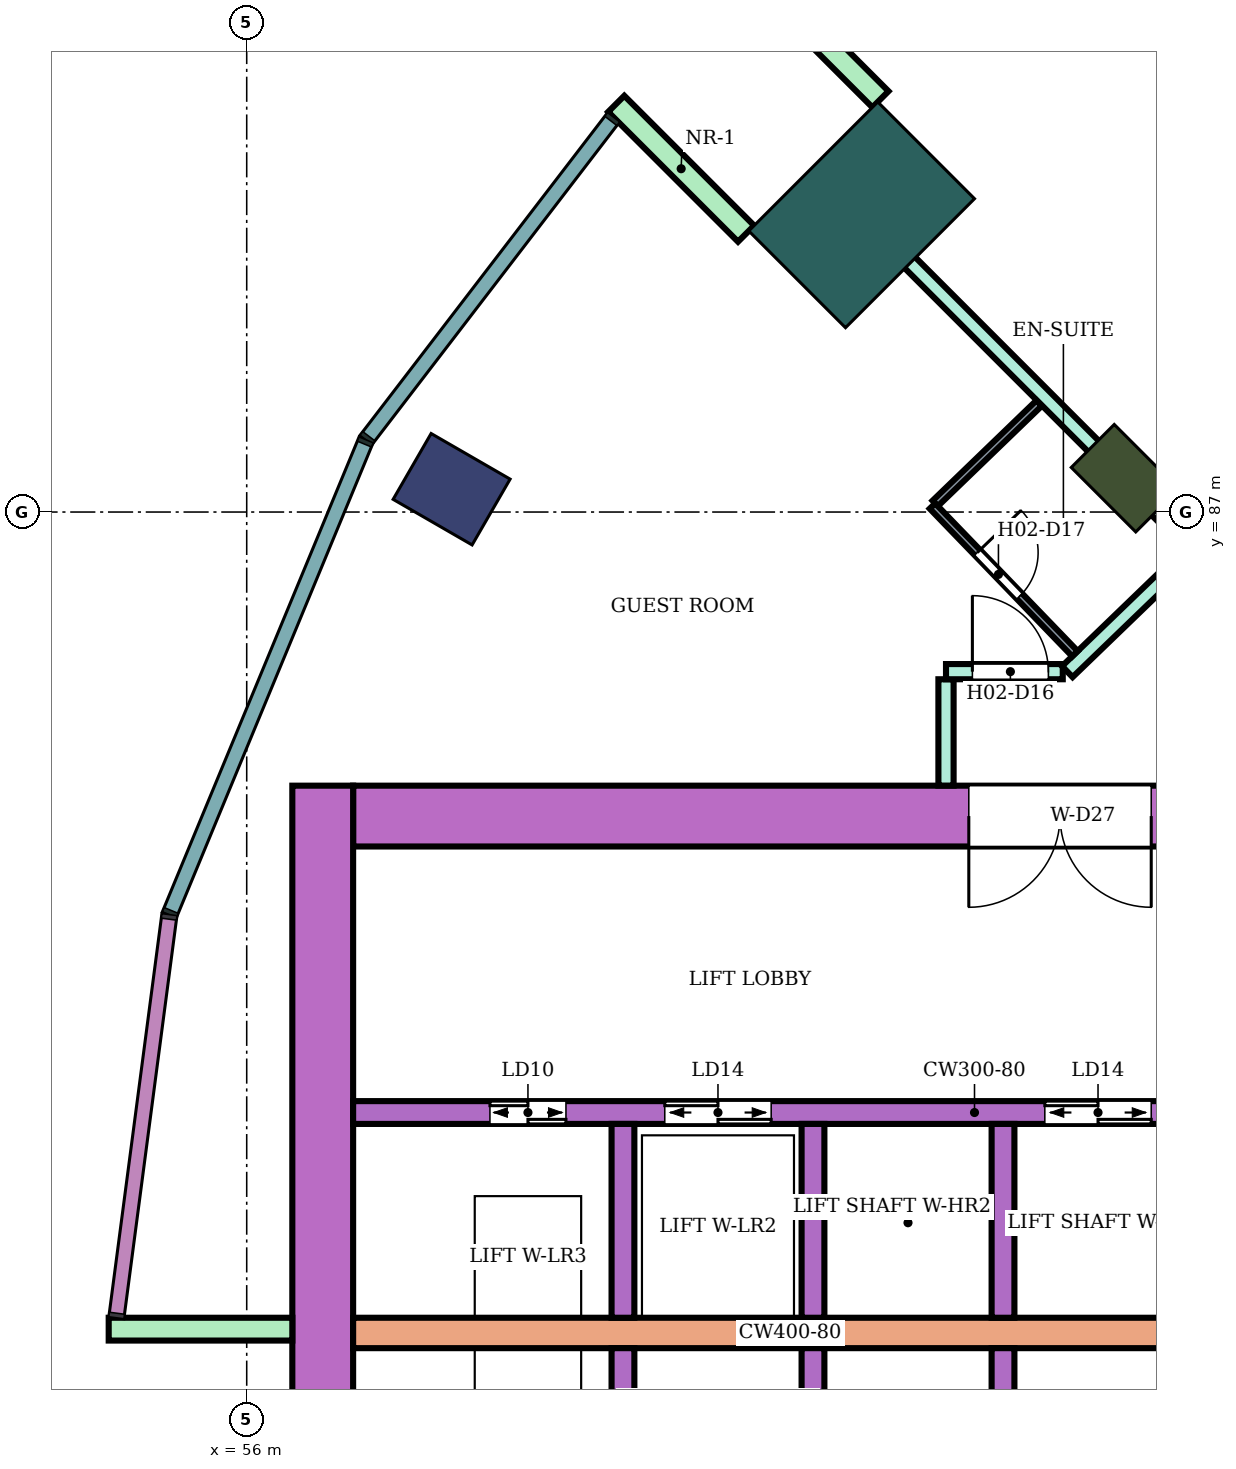
"""IFC4 building model, lengths in metres.
Left out: names, types, materials, properties, quantities, classifications, styles, units other than length and angle.
Written with IfcOpenShell. Run it as: python <this file> out.ifc"""

import sys

from ifc_helpers import new_model, si_unit, direction, frame, frame_2d, origin, origin_2d, place, context, subcontext, project, spatial, rectangle, extrude, element, fill, save


model = new_model("IFC4")
c1 = context("Model", 3, precision=1e-05, world=origin(), true_north=direction((0.0, 1.0)))
c2 = subcontext(c1, "Body", "Model", "MODEL_VIEW")
j1 = project(units=[si_unit("LENGTHUNIT", "METRE"), si_unit("PLANEANGLEUNIT", "RADIAN")], contexts=[c1])
p1 = place(None, origin())
s1 = spatial("IfcSite", under=j1, at=p1, CompositionType="ELEMENT")
p2 = place(p1, origin())
s2 = spatial("IfcBuilding", under=s1, at=p2, CompositionType="ELEMENT")
p3 = place(p2, frame((0.0, 0.0, 47.8)))
s3 = spatial("IfcBuildingStorey", under=s2, at=p3, CompositionType="ELEMENT", Elevation=47.8)
p4 = place(p3, frame((58.696, 87.3, 0.0), z_axis=(0.0, 0.0, 1.0), x_axis=(-0.866025403784, 0.5, 0.0)))
e1 = element("IfcColumn", 1, at=p4, inside=s3, PredefinedType="COLUMN", context=c2, shape_type="SweptSolid", body=[
    extrude(rectangle(XDim=1.2, YDim=1.0, at=origin_2d()), origin(), (0.0, 0.0, 1.0), 3.8),
])
p5 = place(p3, frame((67.555, 87.445, 0.0), z_axis=(0.0, 0.0, 1.0), x_axis=(-0.707106781187, 0.707106781187, 0.0)))
e2 = element("IfcColumn", 2, at=p5, inside=s3, PredefinedType="COLUMN", context=c2, shape_type="SweptSolid", body=[
    extrude(rectangle(XDim=1.2, YDim=0.8, at=origin_2d()), origin(), (0.0, 0.0, 1.0), 3.8),
])
p6 = place(p3, frame((64.09, 90.91, 0.0), z_axis=(0.0, 0.0, 1.0), x_axis=(-0.707106781187, 0.707106781187, 0.0)))
e3 = element("IfcColumn", 3, at=p6, inside=s3, PredefinedType="COLUMN", context=c2, shape_type="SweptSolid", body=[
    extrude(rectangle(XDim=1.8, YDim=2.4, at=origin_2d()), origin(), (0.0, 0.0, 1.0), 3.8),
])
p7 = place(p3, frame((72.1, 83.0, 0.0), z_axis=(0.0, 0.0, 1.0), x_axis=(-1.0, 0.0, 0.0)))
e4 = element("IfcWall", 4, at=p7, inside=s3, PredefinedType="SHEAR", context=c2, shape_type="SweptSolid", body=[
    extrude(rectangle(XDim=14.7, YDim=0.8, at=frame_2d((7.35, 0.0))), origin(), (0.0, 0.0, 1.0), 3.48),
])
p8 = place(p7, frame((4.2, 0.0, 0.0)))
e5 = element("IfcOpeningElement", 5, at=p8, cuts=e4, PredefinedType="OPENING", context=c2, shape_type="SweptSolid", body=[
    extrude(rectangle(XDim=2.4, YDim=2.4, at=frame_2d((1.2, 1.2))), frame((0.0, 0.41, 0.0), z_axis=(0.0, -1.0, 0.0), x_axis=(1.0, 0.0, 0.0)), (0.0, 0.0, 1.0), 0.82),
])
p9 = place(p3, frame((57.0, 83.4, 0.0), z_axis=(0.0, 0.0, 1.0), x_axis=(0.0, -1.0, 0.0)))
e6 = element("IfcWall", 6, at=p9, inside=s3, PredefinedType="SHEAR", context=c2, shape_type="SweptSolid", body=[
    extrude(rectangle(XDim=16.8, YDim=0.8, at=frame_2d((8.4, 0.0))), origin(), (0.0, 0.0, 1.0), 3.48),
])
p10 = place(p3, frame((68.3, 76.2, 0.0), z_axis=(0.0, 0.0, 1.0), x_axis=(-1.0, 0.0, 0.0)))
e7 = element("IfcWall", 7, at=p10, inside=s3, PredefinedType="SHEAR", context=c2, shape_type="SweptSolid", body=[
    extrude(rectangle(XDim=10.9, YDim=0.4, at=frame_2d((5.45, 0.0))), origin(), (0.0, 0.0, 1.0), 3.48),
])
p11 = place(p3, frame((68.3, 79.1, 0.0), z_axis=(0.0, 0.0, 1.0), x_axis=(-1.0, 0.0, 0.0)))
e8 = element("IfcWall", 8, at=p11, inside=s3, PredefinedType="SHEAR", context=c2, shape_type="SweptSolid", body=[
    extrude(rectangle(XDim=10.9, YDim=0.3, at=frame_2d((5.45, 0.0))), origin(), (0.0, 0.0, 1.0), 3.48),
])
p12 = place(p11, frame((0.4, 0.0, 0.0)))
e9 = element("IfcOpeningElement", 9, at=p12, cuts=e8, PredefinedType="OPENING", context=c2, shape_type="SweptSolid", body=[
    extrude(rectangle(XDim=1.4, YDim=2.1, at=frame_2d((0.7, 1.05))), frame((0.0, 0.16, 0.0), z_axis=(0.0, -1.0, 0.0), x_axis=(1.0, 0.0, 0.0)), (0.0, 0.0, 1.0), 0.32),
])
p13 = place(p11, frame((5.4, 0.0, 0.0)))
e10 = element("IfcOpeningElement", 10, at=p13, cuts=e8, PredefinedType="OPENING", context=c2, shape_type="SweptSolid", body=[
    extrude(rectangle(XDim=1.4, YDim=2.1, at=frame_2d((0.7, 1.05))), frame((0.0, 0.16, 0.0), z_axis=(0.0, -1.0, 0.0), x_axis=(1.0, 0.0, 0.0)), (0.0, 0.0, 1.0), 0.32),
])
p14 = place(p11, frame((8.1, 0.0, 0.0)))
e11 = element("IfcOpeningElement", 11, at=p14, cuts=e8, PredefinedType="OPENING", context=c2, shape_type="SweptSolid", body=[
    extrude(rectangle(XDim=1.0, YDim=2.1, at=frame_2d((0.5, 1.05))), frame((0.0, 0.16, 0.0), z_axis=(0.0, -1.0, 0.0), x_axis=(1.0, 0.0, 0.0)), (0.0, 0.0, 1.0), 0.32),
])
for number, where, z_axis, x_axis in (
    (12, (65.95, 76.0, 0.0), (0.0, 0.0, 1.0), (0.0, -1.0, 0.0)),
    (13, (63.45, 76.0, 0.0), (0.0, 0.0, 1.0), (0.0, -1.0, 0.0)),
    (14, (60.95, 76.0, 0.0), (0.0, 0.0, 1.0), (0.0, -1.0, 0.0)),
    (15, (65.95, 78.95, 0.0), (0.0, 0.0, 1.0), (0.0, -1.0, 0.0)),
    (16, (63.45, 78.95, 0.0), (0.0, 0.0, 1.0), (0.0, -1.0, 0.0)),
    (17, (60.95, 78.95, 0.0), (0.0, 0.0, 1.0), (0.0, -1.0, 0.0)),
):
    element("IfcWall", number, at=place(p3, frame(where, z_axis=z_axis, x_axis=x_axis)), inside=s3, PredefinedType="SHEAR", context=c2, shape_type="SweptSolid", body=[
        extrude(rectangle(XDim=2.55, YDim=0.3, at=frame_2d((1.275, 0.0))), origin(), (0.0, 0.0, 1.0), 3.48),
    ])
for number, where, z_axis, x_axis in (
    (18, (64.338, 92.43, 0.0), (0.0, 0.0, 1.0), (-0.707, 0.707, 0.0)),
    (19, (62.57, 90.662, 0.0), (0.0, 0.0, 1.0), (-0.707, 0.707, 0.0)),
    (20, (56.6, 76.25, 0.0), (0.0, 0.0, 1.0), (-1.0, 0.0, 0.0)),
):
    element("IfcWall", number, at=place(p3, frame(where, z_axis=z_axis, x_axis=x_axis)), inside=s3, PredefinedType="NOTDEFINED", context=c2, shape_type="SweptSolid", body=[
        extrude(rectangle(XDim=2.416, YDim=0.3, at=frame_2d((1.208, 0.0))), origin(), (0.0, 0.0, 1.0), 3.8),
    ])
p15 = place(p3, frame((63.599, 91.408, 0.0), z_axis=(0.0, 0.0, 1.0), x_axis=(0.706981017422, -0.707232522587, 0.0)))
e21 = element("IfcWall", 21, at=p15, inside=s3, PredefinedType="PARTITIONING", context=c2, shape_type="SweptSolid", body=[
    extrude(rectangle(XDim=6.795, YDim=0.2, at=frame_2d((3.397, 0.0))), origin(), (0.0, 0.0, 1.0), 3.35),
])
p16 = place(p3, frame((65.2, 83.401, 0.0), z_axis=(0.0, 0.0, 1.0), x_axis=(0.0, 1.0, 0.0)))
e22 = element("IfcWall", 22, at=p16, inside=s3, PredefinedType="PARTITIONING", context=c2, shape_type="SweptSolid", body=[
    extrude(rectangle(XDim=1.399, YDim=0.2, at=frame_2d((0.7, 0.0))), origin(), (0.0, 0.0, 1.0), 3.35),
])
p17 = place(p3, frame((65.2, 84.9, 0.0), z_axis=(0.0, 0.0, 1.0), x_axis=(1.0, 0.0, 0.0)))
e23 = element("IfcWall", 23, at=p17, inside=s3, PredefinedType="PARTITIONING", context=c2, shape_type="SweptSolid", body=[
    extrude(rectangle(XDim=1.536, YDim=0.2, at=frame_2d((0.768, 0.0))), origin(), (0.0, 0.0, 1.0), 3.35),
])
p18 = place(p17, frame((0.347, 0.0, 0.0)))
e24 = element("IfcOpeningElement", 24, at=p18, cuts=e23, PredefinedType="OPENING", context=c2, shape_type="SweptSolid", body=[
    extrude(rectangle(XDim=1.0, YDim=2.1, at=frame_2d((0.5, 1.05))), frame((0.0, 0.11, 0.0), z_axis=(0.0, -1.0, 0.0), x_axis=(1.0, 0.0, 0.0)), (0.0, 0.0, 1.0), 0.22),
])
p19 = place(p3, frame((66.796, 84.9, 0.0), z_axis=(0.0, 0.0, 1.0), x_axis=(0.719690131178, 0.694295409092, 0.0)))
e25 = element("IfcWall", 25, at=p19, inside=s3, PredefinedType="PARTITIONING", context=c2, shape_type="SweptSolid", body=[
    extrude(rectangle(XDim=6.585, YDim=0.2, at=frame_2d((3.293, 0.0))), origin(), (0.0, 0.0, 1.0), 3.35),
])
p20 = place(p19, frame((2.867, 0.0, 0.0)))
e26 = element("IfcOpeningElement", 26, at=p20, cuts=e25, PredefinedType="OPENING", context=c2, shape_type="SweptSolid", body=[
    extrude(rectangle(XDim=1.0, YDim=2.1, at=frame_2d((0.5, 1.05))), frame((0.0, 0.11, 0.0), z_axis=(0.0, -1.0, 0.0), x_axis=(1.0, 0.0, 0.0)), (0.0, 0.0, 1.0), 0.22),
])
p21 = place(p3, frame((67.103, 97.343, 0.0), z_axis=(0.0, 0.0, 1.0), x_axis=(0.499900389553, -0.866082906265, 0.0)))
e27 = element("IfcWall", 27, at=p21, inside=s3, PredefinedType="PARTITIONING", context=c2, shape_type="SweptSolid", body=[
    extrude(rectangle(XDim=8.908, YDim=0.2, at=frame_2d((4.454, 0.0))), origin(), (0.0, 0.0, 1.0), 3.35),
])
p22 = place(p3, frame((65.058, 87.114, 0.0), z_axis=(0.0, 0.0, 1.0), x_axis=(0.719715847356, 0.694268751324, 0.0)))
e28 = element("IfcWall", 28, at=p22, inside=s3, PredefinedType="PARTITIONING", context=c2, shape_type="SweptSolid", body=[
    extrude(rectangle(XDim=1.9, YDim=0.1, at=frame_2d((0.95, 0.0))), origin(), (0.0, 0.0, 1.0), 3.35),
])
p23 = place(p3, frame((65.022, 87.079, 0.0), z_axis=(0.0, 0.0, 1.0), x_axis=(0.694287838235, -0.719697434815, 0.0)))
e29 = element("IfcWall", 29, at=p23, inside=s3, PredefinedType="PARTITIONING", context=c2, shape_type="SweptSolid", body=[
    extrude(rectangle(XDim=2.7, YDim=0.1, at=frame_2d((1.35, 0.0))), origin(), (0.0, 0.0, 1.0), 3.35),
])
p24 = place(p23, frame((0.85, 0.0, 0.0)))
e30 = element("IfcOpeningElement", 30, at=p24, cuts=e29, PredefinedType="OPENING", context=c2, shape_type="SweptSolid", body=[
    extrude(rectangle(XDim=0.8, YDim=2.1, at=frame_2d((0.4, 1.05))), frame((0.0, 0.06, 0.0), z_axis=(0.0, -1.0, 0.0), x_axis=(1.0, 0.0, 0.0)), (0.0, 0.0, 1.0), 0.12),
])
p25 = place(p18, origin())
e31 = element("IfcDoor", 31, at=p25, inside=s3, OperationType="SINGLE_SWING_LEFT", PredefinedType="DOOR", context=c2, shape_type="SweptSolid", body=[
    extrude(rectangle(XDim=1.0, YDim=2.1, at=frame_2d((0.5, 1.05))), frame((0.0, 0.025, 0.0), z_axis=(0.0, -1.0, 0.0), x_axis=(1.0, 0.0, 0.0)), (0.0, 0.0, 1.0), 0.05),
])
fill(e24, e31)
p26 = place(p24, origin())
e32 = element("IfcDoor", 32, at=p26, inside=s3, OperationType="SINGLE_SWING_LEFT", PredefinedType="DOOR", context=c2, shape_type="SweptSolid", body=[
    extrude(rectangle(XDim=0.8, YDim=2.1, at=frame_2d((0.4, 1.05))), frame((0.0, 0.025, 0.0), z_axis=(0.0, -1.0, 0.0), x_axis=(1.0, 0.0, 0.0)), (0.0, 0.0, 1.0), 0.05),
])
fill(e30, e32)
p27 = place(p12, origin())
e33 = element("IfcDoor", 33, at=p27, inside=s3, OperationType="DOUBLE_DOOR_SLIDING", PredefinedType="DOOR", context=c2, shape_type="SweptSolid", body=[
    extrude(rectangle(XDim=1.4, YDim=2.1, at=frame_2d((0.7, 1.05))), frame((0.0, 0.025, 0.0), z_axis=(0.0, -1.0, 0.0), x_axis=(1.0, 0.0, 0.0)), (0.0, 0.0, 1.0), 0.05),
])
fill(e9, e33)
p28 = place(p13, origin())
e34 = element("IfcDoor", 34, at=p28, inside=s3, OperationType="DOUBLE_DOOR_SLIDING", PredefinedType="DOOR", context=c2, shape_type="SweptSolid", body=[
    extrude(rectangle(XDim=1.4, YDim=2.1, at=frame_2d((0.7, 1.05))), frame((0.0, 0.025, 0.0), z_axis=(0.0, -1.0, 0.0), x_axis=(1.0, 0.0, 0.0)), (0.0, 0.0, 1.0), 0.05),
])
fill(e10, e34)
p29 = place(p14, origin())
e35 = element("IfcDoor", 35, at=p29, inside=s3, OperationType="DOUBLE_DOOR_SLIDING", PredefinedType="DOOR", context=c2, shape_type="SweptSolid", body=[
    extrude(rectangle(XDim=1.0, YDim=2.1, at=frame_2d((0.5, 1.05))), frame((0.0, 0.025, 0.0), z_axis=(0.0, -1.0, 0.0), x_axis=(1.0, 0.0, 0.0)), (0.0, 0.0, 1.0), 0.05),
])
fill(e11, e35)
p30 = place(p8, origin())
e36 = element("IfcDoor", 36, at=p30, inside=s3, OperationType="DOUBLE_DOOR_SINGLE_SWING", PredefinedType="DOOR", context=c2, shape_type="SweptSolid", body=[
    extrude(rectangle(XDim=2.4, YDim=2.4, at=frame_2d((1.2, 1.2))), frame((0.0, 0.025, 0.0), z_axis=(0.0, -1.0, 0.0), x_axis=(1.0, 0.0, 0.0)), (0.0, 0.0, 1.0), 0.05),
])
fill(e5, e36)
save(model, sys.argv[1])
